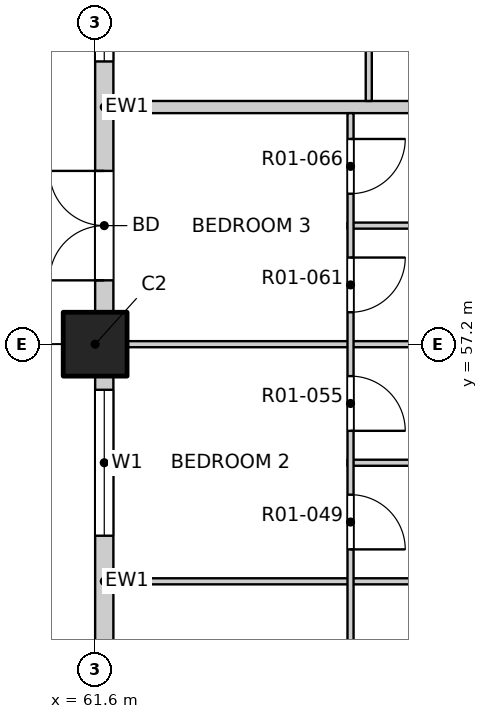
"""IFC4 building model, lengths in metres.
Left out: names, types, materials, properties, quantities, classifications, styles, units other than length and angle.
Written with IfcOpenShell. Run it as: python <this file> out.ifc"""

import sys

from ifc_helpers import new_model, si_unit, direction, frame, frame_2d, origin, origin_2d, place, context, subcontext, project, spatial, rectangle, extrude, element, fill, save


model = new_model("IFC4")
c1 = context("Model", 3, precision=1e-05, world=origin(), true_north=direction((0.0, 1.0)))
c2 = subcontext(c1, "Body", "Model", "MODEL_VIEW")
j1 = project(units=[si_unit("LENGTHUNIT", "METRE"), si_unit("PLANEANGLEUNIT", "RADIAN")], contexts=[c1])
p1 = place(None, origin())
s1 = spatial("IfcSite", under=j1, at=p1, CompositionType="ELEMENT")
p2 = place(p1, origin())
s2 = spatial("IfcBuilding", under=s1, at=p2, CompositionType="ELEMENT")
p3 = place(p2, frame((0.0, 0.0, 26.3)))
s3 = spatial("IfcBuildingStorey", under=s2, at=p3, CompositionType="ELEMENT", Elevation=26.3)
p4 = place(p3, frame((61.6, 57.2, -0.25), z_axis=(0.0, 0.0, 1.0), x_axis=(1.0, 0.0, 0.0)))
e1 = element("IfcColumn", 1, at=p4, inside=s3, PredefinedType="COLUMN", context=c2, shape_type="SweptSolid", body=[
    extrude(rectangle(XDim=1.05, YDim=1.05, at=origin_2d()), origin(), (0.0, 0.0, 1.0), 3.4),
])
p5 = place(p3, frame((61.75, 49.925, 0.0), z_axis=(0.0, 0.0, 1.0), x_axis=(0.0, 1.0, 0.0)))
e2 = element("IfcWall", 2, at=p5, inside=s3, PredefinedType="SOLIDWALL", context=c2, shape_type="SweptSolid", body=[
    extrude(rectangle(XDim=6.75, YDim=0.3, at=frame_2d((3.375, 0.0))), origin(), (0.0, 0.0, 1.0), 2.7),
])
p6 = place(p5, frame((0.525, 0.0, 0.0)))
e3 = element("IfcOpeningElement", 3, at=p6, cuts=e2, PredefinedType="OPENING", context=c2, shape_type="SweptSolid", body=[
    extrude(rectangle(XDim=1.8, YDim=2.4, at=frame_2d((0.9, 1.2))), frame((0.0, 0.16, 0.0), z_axis=(0.0, -1.0, 0.0), x_axis=(1.0, 0.0, 0.0)), (0.0, 0.0, 1.0), 0.32),
])
p7 = place(p5, frame((4.125, 0.0, 0.9)))
e4 = element("IfcOpeningElement", 4, at=p7, cuts=e2, PredefinedType="OPENING", context=c2, shape_type="SweptSolid", body=[
    extrude(rectangle(XDim=2.4, YDim=1.8, at=frame_2d((1.2, 0.9))), frame((0.0, 0.16, 0.0), z_axis=(0.0, -1.0, 0.0), x_axis=(1.0, 0.0, 0.0)), (0.0, 0.0, 1.0), 0.32),
])
p8 = place(p3, frame((61.75, 57.725, 0.0), z_axis=(0.0, 0.0, 1.0), x_axis=(0.0, 1.0, 0.0)))
e5 = element("IfcWall", 5, at=p8, inside=s3, PredefinedType="SOLIDWALL", context=c2, shape_type="SweptSolid", body=[
    extrude(rectangle(XDim=6.75, YDim=0.3, at=frame_2d((3.375, 0.0))), origin(), (0.0, 0.0, 1.0), 2.7),
])
p9 = place(p8, frame((0.525, 0.0, 0.0)))
e6 = element("IfcOpeningElement", 6, at=p9, cuts=e5, PredefinedType="OPENING", context=c2, shape_type="SweptSolid", body=[
    extrude(rectangle(XDim=1.8, YDim=2.4, at=frame_2d((0.9, 1.2))), frame((0.0, 0.16, 0.0), z_axis=(0.0, -1.0, 0.0), x_axis=(1.0, 0.0, 0.0)), (0.0, 0.0, 1.0), 0.32),
])
p10 = place(p8, frame((4.125, 0.0, 0.9)))
e7 = element("IfcOpeningElement", 7, at=p10, cuts=e5, PredefinedType="OPENING", context=c2, shape_type="SweptSolid", body=[
    extrude(rectangle(XDim=2.4, YDim=1.8, at=frame_2d((1.2, 0.9))), frame((0.0, 0.16, 0.0), z_axis=(0.0, -1.0, 0.0), x_axis=(1.0, 0.0, 0.0)), (0.0, 0.0, 1.0), 0.32),
])
p11 = place(p3, frame((61.9, 53.3, 0.0), z_axis=(0.0, 0.0, 1.0), x_axis=(1.0, 0.0, 0.0)))
e8 = element("IfcWall", 8, at=p11, inside=s3, PredefinedType="PARTITIONING", context=c2, shape_type="SweptSolid", body=[
    extrude(rectangle(XDim=7.55, YDim=0.1, at=frame_2d((3.775, 0.0))), origin(), (0.0, 0.0, 1.0), 3.15),
])
p12 = place(p3, frame((65.75, 55.25, 0.0), z_axis=(0.0, 0.0, 1.0), x_axis=(1.0, 0.0, 0.0)))
e9 = element("IfcWall", 9, at=p12, inside=s3, PredefinedType="PARTITIONING", context=c2, shape_type="SweptSolid", body=[
    extrude(rectangle(XDim=3.7, YDim=0.1, at=frame_2d((1.85, 0.0))), origin(), (0.0, 0.0, 1.0), 3.15),
])
p13 = place(p3, frame((61.9, 57.2, 0.0), z_axis=(0.0, 0.0, 1.0), x_axis=(1.0, 0.0, 0.0)))
e10 = element("IfcWall", 10, at=p13, inside=s3, PredefinedType="PARTITIONING", context=c2, shape_type="SweptSolid", body=[
    extrude(rectangle(XDim=7.55, YDim=0.1, at=frame_2d((3.775, 0.0))), origin(), (0.0, 0.0, 1.0), 2.55),
])
p14 = place(p3, frame((65.75, 59.15, 0.0), z_axis=(0.0, 0.0, 1.0), x_axis=(1.0, 0.0, 0.0)))
e11 = element("IfcWall", 11, at=p14, inside=s3, PredefinedType="PARTITIONING", context=c2, shape_type="SweptSolid", body=[
    extrude(rectangle(XDim=3.7, YDim=0.1, at=frame_2d((1.85, 0.0))), origin(), (0.0, 0.0, 1.0), 3.15),
])
p15 = place(p3, frame((61.9, 61.1, 0.0), z_axis=(0.0, 0.0, 1.0), x_axis=(1.0, 0.0, 0.0)))
e12 = element("IfcWall", 12, at=p15, inside=s3, PredefinedType="PARTITIONING", context=c2, shape_type="SweptSolid", body=[
    extrude(rectangle(XDim=11.5, YDim=0.2, at=frame_2d((5.75, 0.0))), origin(), (0.0, 0.0, 1.0), 3.15),
])
p16 = place(p3, frame((65.8, 41.9, 0.0), z_axis=(0.0, 0.0, 1.0), x_axis=(0.0, 1.0, 0.0)))
e13 = element("IfcWall", 13, at=p16, inside=s3, PredefinedType="PARTITIONING", context=c2, shape_type="SweptSolid", body=[
    extrude(rectangle(XDim=19.1, YDim=0.1, at=frame_2d((9.55, 0.0))), origin(), (0.0, 0.0, 1.0), 3.15),
])
p17 = place(p16, frame((1.05, 0.0, 0.0)))
e14 = element("IfcOpeningElement", 14, at=p17, cuts=e13, PredefinedType="OPENING", context=c2, shape_type="SweptSolid", body=[
    extrude(rectangle(XDim=1.2, YDim=2.1, at=frame_2d((0.6, 1.05))), frame((0.0, 0.06, 0.0), z_axis=(0.0, -1.0, 0.0), x_axis=(1.0, 0.0, 0.0)), (0.0, 0.0, 1.0), 0.12),
])
p18 = place(p16, frame((4.95, 0.0, 0.0)))
e15 = element("IfcOpeningElement", 15, at=p18, cuts=e13, PredefinedType="OPENING", context=c2, shape_type="SweptSolid", body=[
    extrude(rectangle(XDim=1.2, YDim=2.1, at=frame_2d((0.6, 1.05))), frame((0.0, 0.06, 0.0), z_axis=(0.0, -1.0, 0.0), x_axis=(1.0, 0.0, 0.0)), (0.0, 0.0, 1.0), 0.12),
])
p19 = place(p16, frame((8.85, 0.0, 0.0)))
e16 = element("IfcOpeningElement", 16, at=p19, cuts=e13, PredefinedType="OPENING", context=c2, shape_type="SweptSolid", body=[
    extrude(rectangle(XDim=1.2, YDim=2.1, at=frame_2d((0.6, 1.05))), frame((0.0, 0.06, 0.0), z_axis=(0.0, -1.0, 0.0), x_axis=(1.0, 0.0, 0.0)), (0.0, 0.0, 1.0), 0.12),
])
p20 = place(p16, frame((11.925, 0.0, 0.0)))
e17 = element("IfcOpeningElement", 17, at=p20, cuts=e13, PredefinedType="OPENING", context=c2, shape_type="SweptSolid", body=[
    extrude(rectangle(XDim=0.9, YDim=2.1, at=frame_2d((0.45, 1.05))), frame((0.0, 0.06, 0.0), z_axis=(0.0, -1.0, 0.0), x_axis=(1.0, 0.0, 0.0)), (0.0, 0.0, 1.0), 0.12),
])
p21 = place(p16, frame((13.875, 0.0, 0.0)))
e18 = element("IfcOpeningElement", 18, at=p21, cuts=e13, PredefinedType="OPENING", context=c2, shape_type="SweptSolid", body=[
    extrude(rectangle(XDim=0.9, YDim=2.1, at=frame_2d((0.45, 1.05))), frame((0.0, 0.06, 0.0), z_axis=(0.0, -1.0, 0.0), x_axis=(1.0, 0.0, 0.0)), (0.0, 0.0, 1.0), 0.12),
])
p22 = place(p16, frame((15.825, 0.0, 0.0)))
e19 = element("IfcOpeningElement", 19, at=p22, cuts=e13, PredefinedType="OPENING", context=c2, shape_type="SweptSolid", body=[
    extrude(rectangle(XDim=0.9, YDim=2.1, at=frame_2d((0.45, 1.05))), frame((0.0, 0.06, 0.0), z_axis=(0.0, -1.0, 0.0), x_axis=(1.0, 0.0, 0.0)), (0.0, 0.0, 1.0), 0.12),
])
p23 = place(p16, frame((17.775, 0.0, 0.0)))
e20 = element("IfcOpeningElement", 20, at=p23, cuts=e13, PredefinedType="OPENING", context=c2, shape_type="SweptSolid", body=[
    extrude(rectangle(XDim=0.9, YDim=2.1, at=frame_2d((0.45, 1.05))), frame((0.0, 0.06, 0.0), z_axis=(0.0, -1.0, 0.0), x_axis=(1.0, 0.0, 0.0)), (0.0, 0.0, 1.0), 0.12),
])
p24 = place(p3, frame((66.1, 61.2, 0.0), z_axis=(0.0, 0.0, 1.0), x_axis=(0.0, 1.0, 0.0)))
e21 = element("IfcWall", 21, at=p24, inside=s3, PredefinedType="PARTITIONING", context=c2, shape_type="SweptSolid", body=[
    extrude(rectangle(XDim=7.6, YDim=0.1, at=frame_2d((3.8, 0.0))), origin(), (0.0, 0.0, 1.0), 3.15),
])
p25 = place(p24, frame((1.25, 0.0, 0.0)))
e22 = element("IfcOpeningElement", 22, at=p25, cuts=e21, PredefinedType="OPENING", context=c2, shape_type="SweptSolid", body=[
    extrude(rectangle(XDim=1.2, YDim=2.1, at=frame_2d((0.6, 1.05))), frame((0.0, 0.06, 0.0), z_axis=(0.0, -1.0, 0.0), x_axis=(1.0, 0.0, 0.0)), (0.0, 0.0, 1.0), 0.12),
])
p26 = place(p24, frame((4.325, 0.0, 0.0)))
e23 = element("IfcOpeningElement", 23, at=p26, cuts=e21, PredefinedType="OPENING", context=c2, shape_type="SweptSolid", body=[
    extrude(rectangle(XDim=0.9, YDim=2.1, at=frame_2d((0.45, 1.05))), frame((0.0, 0.06, 0.0), z_axis=(0.0, -1.0, 0.0), x_axis=(1.0, 0.0, 0.0)), (0.0, 0.0, 1.0), 0.12),
])
p27 = place(p24, frame((6.275, 0.0, 0.0)))
e24 = element("IfcOpeningElement", 24, at=p27, cuts=e21, PredefinedType="OPENING", context=c2, shape_type="SweptSolid", body=[
    extrude(rectangle(XDim=0.9, YDim=2.1, at=frame_2d((0.45, 1.05))), frame((0.0, 0.06, 0.0), z_axis=(0.0, -1.0, 0.0), x_axis=(1.0, 0.0, 0.0)), (0.0, 0.0, 1.0), 0.12),
])
p28 = place(p7, origin())
e25 = element("IfcWindow", 25, at=p28, inside=s3, PartitioningType="DOUBLE_PANEL_VERTICAL", PredefinedType="WINDOW", context=c2, shape_type="SweptSolid", body=[
    extrude(rectangle(XDim=2.4, YDim=1.8, at=frame_2d((1.2, 0.9))), frame((0.0, 0.03, 0.0), z_axis=(0.0, -1.0, 0.0), x_axis=(1.0, 0.0, 0.0)), (0.0, 0.0, 1.0), 0.06),
])
fill(e4, e25)
p29 = place(p9, origin())
e26 = element("IfcDoor", 26, at=p29, inside=s3, OperationType="DOUBLE_DOOR_SINGLE_SWING", PredefinedType="DOOR", context=c2, shape_type="SweptSolid", body=[
    extrude(rectangle(XDim=1.8, YDim=2.4, at=frame_2d((0.9, 1.2))), frame((0.0, 0.025, 0.0), z_axis=(0.0, -1.0, 0.0), x_axis=(1.0, 0.0, 0.0)), (0.0, 0.0, 1.0), 0.05),
])
fill(e6, e26)
p30 = place(p10, origin())
e27 = element("IfcWindow", 27, at=p30, inside=s3, PartitioningType="DOUBLE_PANEL_VERTICAL", PredefinedType="WINDOW", context=c2, shape_type="SweptSolid", body=[
    extrude(rectangle(XDim=2.4, YDim=1.8, at=frame_2d((1.2, 0.9))), frame((0.0, 0.03, 0.0), z_axis=(0.0, -1.0, 0.0), x_axis=(1.0, 0.0, 0.0)), (0.0, 0.0, 1.0), 0.06),
])
fill(e7, e27)
p31 = place(p20, origin())
e28 = element("IfcDoor", 28, at=p31, inside=s3, OperationType="SINGLE_SWING_RIGHT", PredefinedType="DOOR", context=c2, shape_type="SweptSolid", body=[
    extrude(rectangle(XDim=0.9, YDim=2.1, at=frame_2d((0.45, 1.05))), frame((0.0, 0.025, 0.0), z_axis=(0.0, -1.0, 0.0), x_axis=(1.0, 0.0, 0.0)), (0.0, 0.0, 1.0), 0.05),
])
fill(e17, e28)
p32 = place(p21, origin())
e29 = element("IfcDoor", 29, at=p32, inside=s3, OperationType="SINGLE_SWING_RIGHT", PredefinedType="DOOR", context=c2, shape_type="SweptSolid", body=[
    extrude(rectangle(XDim=0.9, YDim=2.1, at=frame_2d((0.45, 1.05))), frame((0.0, 0.025, 0.0), z_axis=(0.0, -1.0, 0.0), x_axis=(1.0, 0.0, 0.0)), (0.0, 0.0, 1.0), 0.05),
])
fill(e18, e29)
p33 = place(p22, origin())
e30 = element("IfcDoor", 30, at=p33, inside=s3, OperationType="SINGLE_SWING_LEFT", PredefinedType="DOOR", context=c2, shape_type="SweptSolid", body=[
    extrude(rectangle(XDim=0.9, YDim=2.1, at=frame_2d((0.45, 1.05))), frame((0.0, 0.025, 0.0), z_axis=(0.0, -1.0, 0.0), x_axis=(1.0, 0.0, 0.0)), (0.0, 0.0, 1.0), 0.05),
])
fill(e19, e30)
p34 = place(p23, origin())
e31 = element("IfcDoor", 31, at=p34, inside=s3, OperationType="SINGLE_SWING_LEFT", PredefinedType="DOOR", context=c2, shape_type="SweptSolid", body=[
    extrude(rectangle(XDim=0.9, YDim=2.1, at=frame_2d((0.45, 1.05))), frame((0.0, 0.025, 0.0), z_axis=(0.0, -1.0, 0.0), x_axis=(1.0, 0.0, 0.0)), (0.0, 0.0, 1.0), 0.05),
])
fill(e20, e31)
save(model, sys.argv[1])
